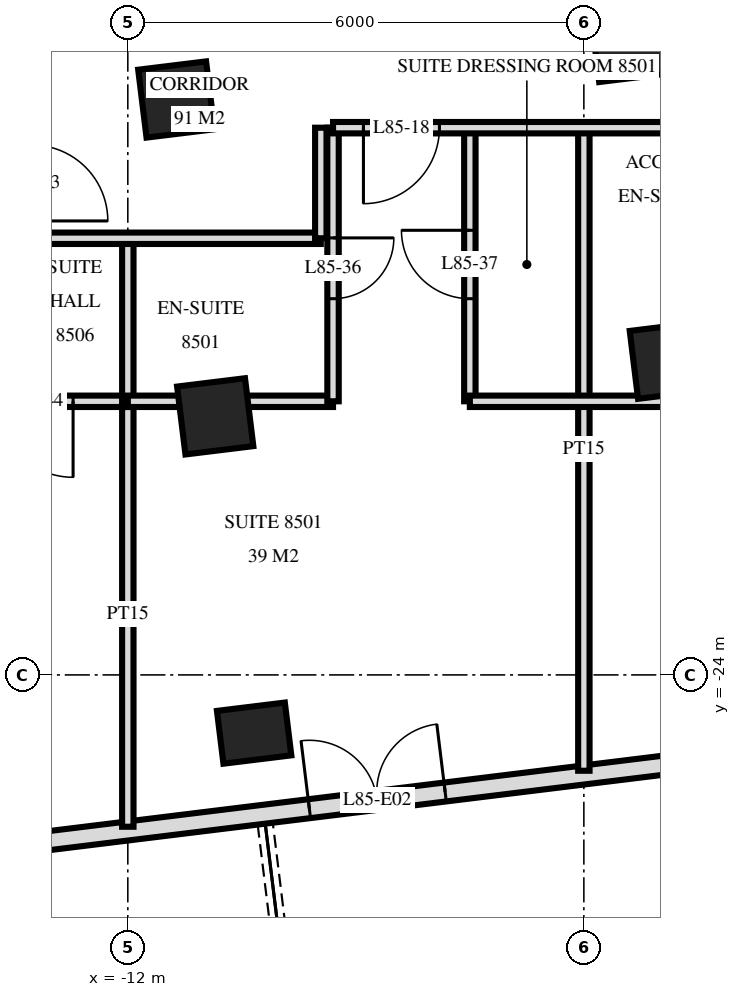
"""IFC4 building model, lengths in metres.
Left out: names, types, materials, properties, quantities, classifications, styles, units other than length and angle.
Written with IfcOpenShell. Run it as: python <this file> out.ifc"""

import sys

from ifc_helpers import new_model, si_unit, direction, frame, frame_2d, origin, origin_2d, place, context, subcontext, project, spatial, rectangle, extrude, element, fill, save


model = new_model("IFC4")
c1 = context("Model", 3, precision=1e-05, world=origin(), true_north=direction((0.0, 1.0)))
c2 = subcontext(c1, "Body", "Model", "MODEL_VIEW")
j1 = project(units=[si_unit("LENGTHUNIT", "METRE"), si_unit("PLANEANGLEUNIT", "RADIAN")], contexts=[c1])
p1 = place(None, origin())
s1 = spatial("IfcSite", under=j1, at=p1, CompositionType="ELEMENT")
p2 = place(p1, origin())
s2 = spatial("IfcBuilding", under=s1, at=p2, CompositionType="ELEMENT")
p3 = place(p2, frame((0.0, 0.0, 322.6)))
s3 = spatial("IfcBuildingStorey", under=s2, at=p3, CompositionType="ELEMENT", Elevation=322.6)
for number, where, z_axis, x_axis in (
    (1, (-11.362, -16.429, 0.0), (0.0, 0.0, 1.0), (0.993, 0.122, 0.0)),
    (2, (-10.85, -20.598, 0.0), (0.0, 0.0, 1.0), (0.993, 0.122, 0.0)),
):
    element("IfcColumn", number, at=place(p3, frame(where, z_axis=z_axis, x_axis=x_axis)), inside=s3, PredefinedType="COLUMN", context=c2, shape_type="SweptSolid", body=[
        extrude(rectangle(XDim=0.9, YDim=0.9, at=origin_2d()), origin(), (0.0, 0.0, 1.0), 4.0),
    ])
p4 = place(p3, frame((-10.338, -24.766, 0.0), z_axis=(0.0, 0.0, 1.0), x_axis=(0.992546151641, 0.121869343405, 0.0)))
e3 = element("IfcColumn", 3, at=p4, inside=s3, PredefinedType="COLUMN", context=c2, shape_type="SweptSolid", body=[
    extrude(rectangle(XDim=0.9, YDim=0.7, at=origin_2d()), origin(), (0.0, 0.0, 1.0), 4.0),
])
for number, where, z_axis, x_axis in (
    (4, (-5.407, -15.698, 0.0), (0.0, 0.0, 1.0), (0.993, 0.122, 0.0)),
    (5, (-4.895, -19.866, 0.0), (0.0, 0.0, 1.0), (0.993, 0.122, 0.0)),
):
    element("IfcColumn", number, at=place(p3, frame(where, z_axis=z_axis, x_axis=x_axis)), inside=s3, PredefinedType="COLUMN", context=c2, shape_type="SweptSolid", body=[
        extrude(rectangle(XDim=0.9, YDim=0.9, at=origin_2d()), origin(), (0.0, 0.0, 1.0), 4.0),
    ])
p5 = place(p3, frame((-16.138, -26.561, 0.0), z_axis=(0.0, 0.0, 1.0), x_axis=(0.992546726876, 0.121864658405, 0.0)))
e6 = element("IfcWall", 6, at=p5, inside=s3, PredefinedType="SOLIDWALL", context=c2, shape_type="SweptSolid", body=[
    extrude(rectangle(XDim=35.951, YDim=0.25, at=frame_2d((17.975, 0.0))), origin(), (0.0, 0.0, 1.0), 3.72),
])
p6 = place(p5, frame((0.575, 0.0, 0.0)))
e7 = element("IfcOpeningElement", 7, at=p6, cuts=e6, PredefinedType="OPENING", context=c2, shape_type="SweptSolid", body=[
    extrude(rectangle(XDim=1.8, YDim=2.4, at=frame_2d((0.9, 1.2))), frame((0.0, 0.135, 0.0), z_axis=(0.0, -1.0, 0.0), x_axis=(1.0, 0.0, 0.0)), (0.0, 0.0, 1.0), 0.27),
])
p7 = place(p5, frame((6.576, 0.0, 0.0)))
e8 = element("IfcOpeningElement", 8, at=p7, cuts=e6, PredefinedType="OPENING", context=c2, shape_type="SweptSolid", body=[
    extrude(rectangle(XDim=1.8, YDim=2.4, at=frame_2d((0.9, 1.2))), frame((0.0, 0.135, 0.0), z_axis=(0.0, -1.0, 0.0), x_axis=(1.0, 0.0, 0.0)), (0.0, 0.0, 1.0), 0.27),
])
p8 = place(p5, frame((12.575, 0.0, 0.0)))
e9 = element("IfcOpeningElement", 9, at=p8, cuts=e6, PredefinedType="OPENING", context=c2, shape_type="SweptSolid", body=[
    extrude(rectangle(XDim=1.8, YDim=2.4, at=frame_2d((0.9, 1.2))), frame((0.0, 0.135, 0.0), z_axis=(0.0, -1.0, 0.0), x_axis=(1.0, 0.0, 0.0)), (0.0, 0.0, 1.0), 0.27),
])
p9 = place(p5, frame((18.575, 0.0, 0.0)))
e10 = element("IfcOpeningElement", 10, at=p9, cuts=e6, PredefinedType="OPENING", context=c2, shape_type="SweptSolid", body=[
    extrude(rectangle(XDim=1.8, YDim=2.4, at=frame_2d((0.9, 1.2))), frame((0.0, 0.135, 0.0), z_axis=(0.0, -1.0, 0.0), x_axis=(1.0, 0.0, 0.0)), (0.0, 0.0, 1.0), 0.27),
])
p10 = place(p5, frame((22.528, 0.0, 0.0)))
e11 = element("IfcOpeningElement", 11, at=p10, cuts=e6, PredefinedType="OPENING", context=c2, shape_type="SweptSolid", body=[
    extrude(rectangle(XDim=1.2, YDim=2.4, at=frame_2d((0.6, 1.2))), frame((0.0, 0.135, 0.0), z_axis=(0.0, -1.0, 0.0), x_axis=(1.0, 0.0, 0.0)), (0.0, 0.0, 1.0), 0.27),
])
p11 = place(p5, frame((25.923, 0.0, 0.0)))
e12 = element("IfcOpeningElement", 12, at=p11, cuts=e6, PredefinedType="OPENING", context=c2, shape_type="SweptSolid", body=[
    extrude(rectangle(XDim=1.8, YDim=2.4, at=frame_2d((0.9, 1.2))), frame((0.0, 0.135, 0.0), z_axis=(0.0, -1.0, 0.0), x_axis=(1.0, 0.0, 0.0)), (0.0, 0.0, 1.0), 0.27),
])
p12 = place(p5, frame((30.576, 0.0, 0.0)))
e13 = element("IfcOpeningElement", 13, at=p12, cuts=e6, PredefinedType="OPENING", context=c2, shape_type="SweptSolid", body=[
    extrude(rectangle(XDim=1.8, YDim=2.4, at=frame_2d((0.9, 1.2))), frame((0.0, 0.135, 0.0), z_axis=(0.0, -1.0, 0.0), x_axis=(1.0, 0.0, 0.0)), (0.0, 0.0, 1.0), 0.27),
])
p13 = place(p3, frame((-6.0, -25.261, 0.0), z_axis=(0.0, 0.0, 1.0), x_axis=(0.0, 1.0, 0.0)))
e14 = element("IfcWall", 14, at=p13, inside=s3, PredefinedType="PARTITIONING", context=c2, shape_type="SweptSolid", body=[
    extrude(rectangle(XDim=8.461, YDim=0.15, at=frame_2d((4.23, 0.0))), origin(), (0.0, 0.0, 1.0), 3.72),
])
p14 = place(p3, frame((-7.5, -20.4, 0.0), z_axis=(0.0, 0.0, 1.0), x_axis=(0.0, 1.0, 0.0)))
e15 = element("IfcWall", 15, at=p14, inside=s3, PredefinedType="PARTITIONING", context=c2, shape_type="SweptSolid", body=[
    extrude(rectangle(XDim=3.6, YDim=0.15, at=frame_2d((1.8, 0.0))), origin(), (0.0, 0.0, 1.0), 3.72),
])
p15 = place(p14, frame((1.35, 0.0, 0.0)))
e16 = element("IfcOpeningElement", 16, at=p15, cuts=e15, PredefinedType="OPENING", context=c2, shape_type="SweptSolid", body=[
    extrude(rectangle(XDim=0.9, YDim=2.1, at=frame_2d((0.45, 1.05))), frame((0.0, 0.085, 0.0), z_axis=(0.0, -1.0, 0.0), x_axis=(1.0, 0.0, 0.0)), (0.0, 0.0, 1.0), 0.17),
])
p16 = place(p3, frame((-9.3, -20.4, 0.0), z_axis=(0.0, 0.0, 1.0), x_axis=(0.0, 1.0, 0.0)))
e17 = element("IfcWall", 17, at=p16, inside=s3, PredefinedType="PARTITIONING", context=c2, shape_type="SweptSolid", body=[
    extrude(rectangle(XDim=3.6, YDim=0.15, at=frame_2d((1.8, 0.0))), origin(), (0.0, 0.0, 1.0), 3.72),
])
p17 = place(p16, frame((1.35, 0.0, 0.0)))
e18 = element("IfcOpeningElement", 18, at=p17, cuts=e17, PredefinedType="OPENING", context=c2, shape_type="SweptSolid", body=[
    extrude(rectangle(XDim=0.8, YDim=2.1, at=frame_2d((0.4, 1.05))), frame((0.0, 0.085, 0.0), z_axis=(0.0, -1.0, 0.0), x_axis=(1.0, 0.0, 0.0)), (0.0, 0.0, 1.0), 0.17),
])
p18 = place(p3, frame((-9.461, -18.255, 0.0), z_axis=(0.0, 0.0, 1.0), x_axis=(0.0, 1.0, 0.0)))
e19 = element("IfcWall", 19, at=p18, inside=s3, PredefinedType="PARTITIONING", context=c2, shape_type="SweptSolid", body=[
    extrude(rectangle(XDim=1.455, YDim=0.15, at=frame_2d((0.728, 0.0))), origin(), (0.0, 0.0, 1.0), 3.72),
])
p19 = place(p3, frame((-12.0, -20.4, 0.0), z_axis=(0.0, 0.0, 1.0), x_axis=(0.0, 1.0, 0.0)))
e20 = element("IfcWall", 20, at=p19, inside=s3, PredefinedType="PARTITIONING", context=c2, shape_type="SweptSolid", body=[
    extrude(rectangle(XDim=2.145, YDim=0.15, at=frame_2d((1.073, 0.0))), origin(), (0.0, 0.0, 1.0), 3.72),
])
p20 = place(p3, frame((-12.0, -25.998, 0.0), z_axis=(0.0, 0.0, 1.0), x_axis=(0.0, 1.0, 0.0)))
e21 = element("IfcWall", 21, at=p20, inside=s3, PredefinedType="PARTITIONING", context=c2, shape_type="SweptSolid", body=[
    extrude(rectangle(XDim=5.598, YDim=0.15, at=frame_2d((2.799, 0.0))), origin(), (0.0, 0.0, 1.0), 3.72),
])
p21 = place(p3, frame((-14.4, -20.4, 0.0), z_axis=(0.0, 0.0, 1.0), x_axis=(1.0, 0.0, 0.0)))
e22 = element("IfcWall", 22, at=p21, inside=s3, PredefinedType="PARTITIONING", context=c2, shape_type="SweptSolid", body=[
    extrude(rectangle(XDim=2.4, YDim=0.15, at=frame_2d((1.2, 0.0))), origin(), (0.0, 0.0, 1.0), 3.72),
])
p22 = place(p21, frame((0.68, 0.0, 0.0)))
e23 = element("IfcOpeningElement", 23, at=p22, cuts=e22, PredefinedType="OPENING", context=c2, shape_type="SweptSolid", body=[
    extrude(rectangle(XDim=1.0, YDim=2.1, at=frame_2d((0.5, 1.05))), frame((0.0, 0.085, 0.0), z_axis=(0.0, -1.0, 0.0), x_axis=(1.0, 0.0, 0.0)), (0.0, 0.0, 1.0), 0.17),
])
p23 = place(p3, frame((-12.0, -20.4, 0.0), z_axis=(0.0, 0.0, 1.0), x_axis=(1.0, 0.0, 0.0)))
e24 = element("IfcWall", 24, at=p23, inside=s3, PredefinedType="PARTITIONING", context=c2, shape_type="SweptSolid", body=[
    extrude(rectangle(XDim=2.7, YDim=0.15, at=frame_2d((1.35, 0.0))), origin(), (0.0, 0.0, 1.0), 3.72),
])
p24 = place(p3, frame((-7.5, -20.4, 0.0), z_axis=(0.0, 0.0, 1.0), x_axis=(1.0, 0.0, 0.0)))
e25 = element("IfcWall", 25, at=p24, inside=s3, PredefinedType="PARTITIONING", context=c2, shape_type="SweptSolid", body=[
    extrude(rectangle(XDim=4.2, YDim=0.15, at=frame_2d((2.1, 0.0))), origin(), (0.0, 0.0, 1.0), 3.72),
])
p25 = place(p3, frame((-13.263, -18.255, 0.0), z_axis=(0.0, 0.0, 1.0), x_axis=(1.0, 0.0, 0.0)))
e26 = element("IfcWall", 26, at=p25, inside=s3, PredefinedType="PARTITIONING", context=c2, shape_type="SweptSolid", body=[
    extrude(rectangle(XDim=3.802, YDim=0.15, at=frame_2d((1.901, 0.0))), origin(), (0.0, 0.0, 1.0), 3.72),
])
p26 = place(p3, frame((-9.3, -16.8, 0.0), z_axis=(0.0, 0.0, 1.0), x_axis=(1.0, 0.0, 0.0)))
e27 = element("IfcWall", 27, at=p26, inside=s3, PredefinedType="PARTITIONING", context=c2, shape_type="SweptSolid", body=[
    extrude(rectangle(XDim=32.561, YDim=0.15, at=frame_2d((16.281, 0.0))), origin(), (0.0, 0.0, 1.0), 3.72),
])
p27 = place(p26, frame((0.4, 0.0, 0.0)))
e28 = element("IfcOpeningElement", 28, at=p27, cuts=e27, PredefinedType="OPENING", context=c2, shape_type="SweptSolid", body=[
    extrude(rectangle(XDim=1.0, YDim=2.1, at=frame_2d((0.5, 1.05))), frame((0.0, 0.085, 0.0), z_axis=(0.0, -1.0, 0.0), x_axis=(1.0, 0.0, 0.0)), (0.0, 0.0, 1.0), 0.17),
])
p28 = place(p26, frame((7.15, 0.0, 0.0)))
e29 = element("IfcOpeningElement", 29, at=p28, cuts=e27, PredefinedType="OPENING", context=c2, shape_type="SweptSolid", body=[
    extrude(rectangle(XDim=1.0, YDim=2.1, at=frame_2d((0.5, 1.05))), frame((0.0, 0.085, 0.0), z_axis=(0.0, -1.0, 0.0), x_axis=(1.0, 0.0, 0.0)), (0.0, 0.0, 1.0), 0.17),
])
p29 = place(p26, frame((9.7, 0.0, 0.0)))
e30 = element("IfcOpeningElement", 30, at=p29, cuts=e27, PredefinedType="OPENING", context=c2, shape_type="SweptSolid", body=[
    extrude(rectangle(XDim=1.0, YDim=2.1, at=frame_2d((0.5, 1.05))), frame((0.0, 0.085, 0.0), z_axis=(0.0, -1.0, 0.0), x_axis=(1.0, 0.0, 0.0)), (0.0, 0.0, 1.0), 0.17),
])
p30 = place(p26, frame((17.149, 0.0, 0.0)))
e31 = element("IfcOpeningElement", 31, at=p30, cuts=e27, PredefinedType="OPENING", context=c2, shape_type="SweptSolid", body=[
    extrude(rectangle(XDim=1.0, YDim=2.1, at=frame_2d((0.5, 1.05))), frame((0.0, 0.085, 0.0), z_axis=(0.0, -1.0, 0.0), x_axis=(1.0, 0.0, 0.0)), (0.0, 0.0, 1.0), 0.17),
])
p31 = place(p26, frame((18.45, 0.0, 0.0)))
e32 = element("IfcOpeningElement", 32, at=p31, cuts=e27, PredefinedType="OPENING", context=c2, shape_type="SweptSolid", body=[
    extrude(rectangle(XDim=1.0, YDim=2.1, at=frame_2d((0.5, 1.05))), frame((0.0, 0.085, 0.0), z_axis=(0.0, -1.0, 0.0), x_axis=(1.0, 0.0, 0.0)), (0.0, 0.0, 1.0), 0.17),
])
p32 = place(p26, frame((24.98, 0.0, 0.0)))
e33 = element("IfcOpeningElement", 33, at=p32, cuts=e27, PredefinedType="OPENING", context=c2, shape_type="SweptSolid", body=[
    extrude(rectangle(XDim=1.0, YDim=2.1, at=frame_2d((0.5, 1.05))), frame((0.0, 0.085, 0.0), z_axis=(0.0, -1.0, 0.0), x_axis=(1.0, 0.0, 0.0)), (0.0, 0.0, 1.0), 0.17),
])
p33 = place(p7, origin())
e34 = element("IfcDoor", 34, at=p33, inside=s3, OperationType="DOUBLE_DOOR_SINGLE_SWING", PredefinedType="DOOR", context=c2, shape_type="SweptSolid", body=[
    extrude(rectangle(XDim=1.8, YDim=2.4, at=frame_2d((0.9, 1.2))), frame((0.0, 0.025, 0.0), z_axis=(0.0, -1.0, 0.0), x_axis=(1.0, 0.0, 0.0)), (0.0, 0.0, 1.0), 0.05),
])
fill(e8, e34)
p34 = place(p27, frame((0.5, 0.0, 0.0), z_axis=(0.0, 0.0, 1.0), x_axis=(-1.0, 0.0, 0.0)))
e35 = element("IfcDoor", 35, at=p34, inside=s3, OperationType="SINGLE_SWING_LEFT", PredefinedType="DOOR", context=c2, shape_type="SweptSolid", body=[
    extrude(rectangle(XDim=1.0, YDim=2.1, at=frame_2d((0.0, 1.05))), frame((0.0, -0.025, 0.0), z_axis=(0.0, 1.0, 0.0), x_axis=(-1.0, 0.0, 0.0)), (0.0, 0.0, 1.0), 0.05),
])
fill(e28, e35)
p35 = place(p17, frame((0.4, 0.0, 0.0), z_axis=(0.0, 0.0, 1.0), x_axis=(-1.0, 0.0, 0.0)))
e36 = element("IfcDoor", 36, at=p35, inside=s3, OperationType="SINGLE_SWING_RIGHT", PredefinedType="DOOR", context=c2, shape_type="SweptSolid", body=[
    extrude(rectangle(XDim=0.8, YDim=2.1, at=frame_2d((0.0, 1.05))), frame((0.0, -0.025, 0.0), z_axis=(0.0, 1.0, 0.0), x_axis=(-1.0, 0.0, 0.0)), (0.0, 0.0, 1.0), 0.05),
])
fill(e18, e36)
p36 = place(p15, origin())
e37 = element("IfcDoor", 37, at=p36, inside=s3, OperationType="SINGLE_SWING_LEFT", PredefinedType="DOOR", context=c2, shape_type="SweptSolid", body=[
    extrude(rectangle(XDim=0.9, YDim=2.1, at=frame_2d((0.45, 1.05))), frame((0.0, 0.025, 0.0), z_axis=(0.0, -1.0, 0.0), x_axis=(1.0, 0.0, 0.0)), (0.0, 0.0, 1.0), 0.05),
])
fill(e16, e37)
p37 = place(p22, frame((0.5, 0.0, 0.0), z_axis=(0.0, 0.0, 1.0), x_axis=(-1.0, 0.0, 0.0)))
e38 = element("IfcDoor", 38, at=p37, inside=s3, OperationType="SINGLE_SWING_RIGHT", PredefinedType="DOOR", context=c2, shape_type="SweptSolid", body=[
    extrude(rectangle(XDim=1.0, YDim=2.1, at=frame_2d((0.0, 1.05))), frame((0.0, -0.025, 0.0), z_axis=(0.0, 1.0, 0.0), x_axis=(-1.0, 0.0, 0.0)), (0.0, 0.0, 1.0), 0.05),
])
fill(e23, e38)
save(model, sys.argv[1])
